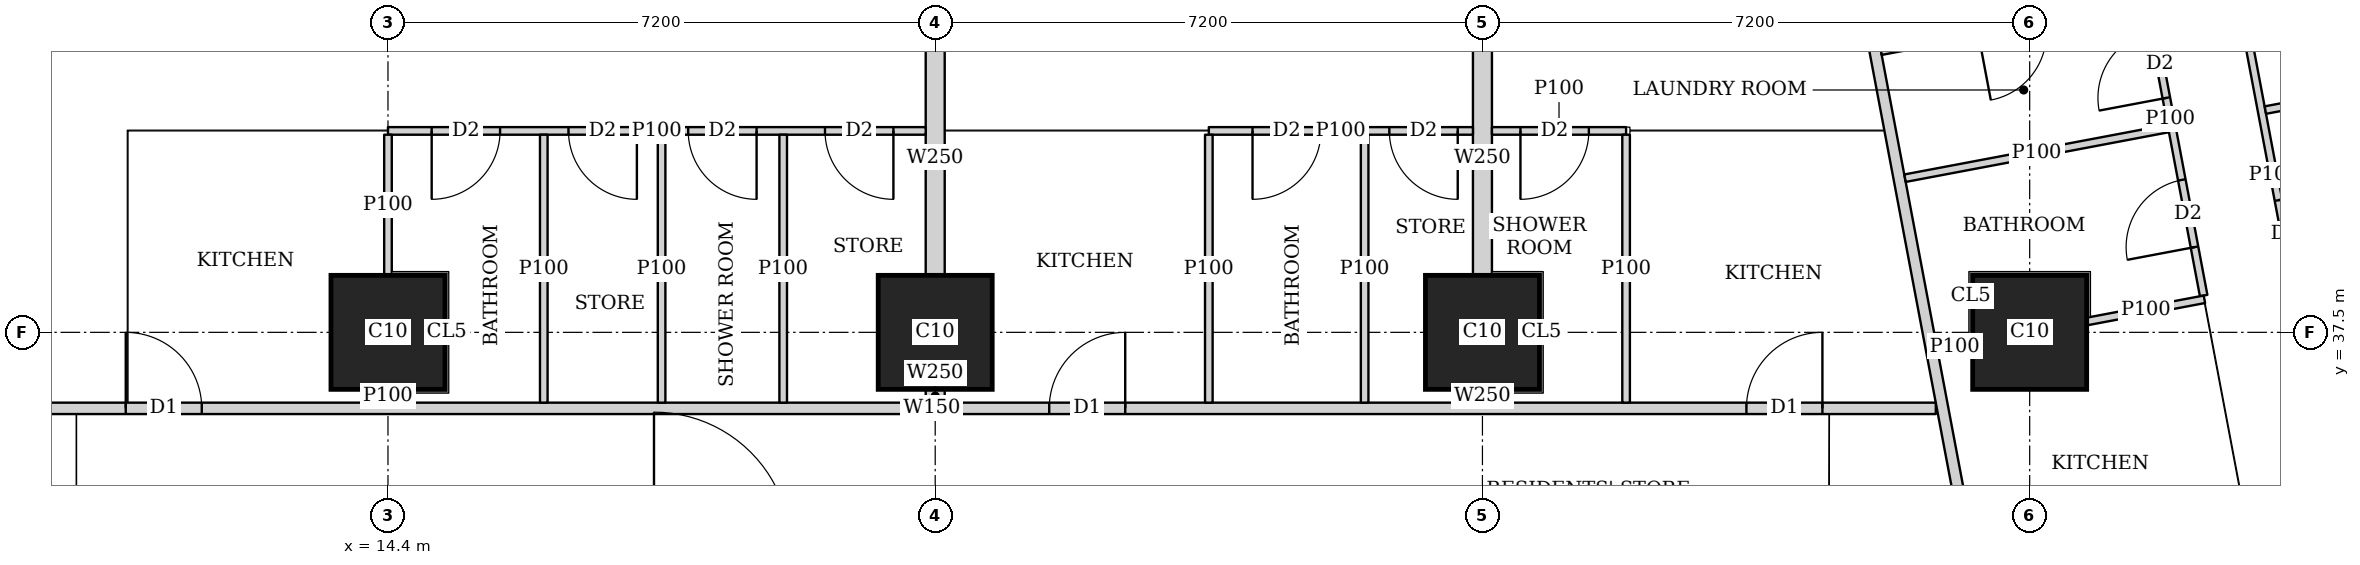
"""IFC4 building model, lengths in metres.
Left out: names, types, materials, properties, quantities, classifications, styles, units other than length and angle.
Written with IfcOpenShell. Run it as: python <this file> out.ifc"""

import sys

from ifc_helpers import new_model, si_unit, direction, frame, frame_2d, origin, origin_2d, place, context, subcontext, project, spatial, rectangle, extrude, element, fill, save


model = new_model("IFC4")
c1 = context("Model", 3, precision=1e-05, world=origin(), true_north=direction((0.0, 1.0)))
c2 = subcontext(c1, "Body", "Model", "MODEL_VIEW")
j1 = project(units=[si_unit("LENGTHUNIT", "METRE"), si_unit("PLANEANGLEUNIT", "RADIAN")], contexts=[c1])
p1 = place(None, origin())
s1 = spatial("IfcSite", under=j1, at=p1, CompositionType="ELEMENT")
p2 = place(p1, origin())
s2 = spatial("IfcBuilding", under=s1, at=p2, CompositionType="ELEMENT")
p3 = place(p2, frame((0.0, 0.0, 180.8)))
s3 = spatial("IfcBuildingStorey", under=s2, at=p3, CompositionType="ELEMENT", Elevation=180.8)
for number, where, z_axis, x_axis in (
    (1, (14.4, 37.5, 0.0), (0.0, 0.0, 1.0), (1.0, 0.0, 0.0)),
    (2, (21.6, 37.5, 0.0), (0.0, 0.0, 1.0), (1.0, 0.0, 0.0)),
    (3, (28.8, 37.5, 0.0), (0.0, 0.0, 1.0), (1.0, 0.0, 0.0)),
    (4, (36.0, 37.5, 0.0), (0.0, 0.0, 1.0), (1.0, 0.0, 0.0)),
):
    element("IfcColumn", number, at=place(p3, frame(where, z_axis=z_axis, x_axis=x_axis)), inside=s3, PredefinedType="COLUMN", context=c2, shape_type="SweptSolid", body=[
        extrude(rectangle(XDim=1.5, YDim=1.5, at=origin_2d()), origin(), (0.0, 0.0, 1.0), 3.75),
    ])
p4 = place(p3, frame((8.35, 36.5, 0.0), z_axis=(0.0, 0.0, 1.0), x_axis=(1.0, 0.0, 0.0)))
e5 = element("IfcWall", 5, at=p4, inside=s3, PredefinedType="SOLIDWALL", context=c2, shape_type="SweptSolid", body=[
    extrude(rectangle(XDim=26.415, YDim=0.15, at=frame_2d((13.208, 0.0))), origin(), (0.0, 0.0, 1.0), 3.5),
])
p5 = place(p4, frame((2.6, 0.0, 0.0)))
e6 = element("IfcOpeningElement", 6, at=p5, cuts=e5, PredefinedType="OPENING", context=c2, shape_type="SweptSolid", body=[
    extrude(rectangle(XDim=1.0, YDim=2.1, at=frame_2d((0.5, 1.05))), frame((0.0, 0.085, 0.0), z_axis=(0.0, -1.0, 0.0), x_axis=(1.0, 0.0, 0.0)), (0.0, 0.0, 1.0), 0.17),
])
p6 = place(p4, frame((14.75, 0.0, 0.0)))
e7 = element("IfcOpeningElement", 7, at=p6, cuts=e5, PredefinedType="OPENING", context=c2, shape_type="SweptSolid", body=[
    extrude(rectangle(XDim=1.0, YDim=2.1, at=frame_2d((0.5, 1.05))), frame((0.0, 0.085, 0.0), z_axis=(0.0, -1.0, 0.0), x_axis=(1.0, 0.0, 0.0)), (0.0, 0.0, 1.0), 0.17),
])
p7 = place(p4, frame((23.923, 0.0, 0.0)))
e8 = element("IfcOpeningElement", 8, at=p7, cuts=e5, PredefinedType="OPENING", context=c2, shape_type="SweptSolid", body=[
    extrude(rectangle(XDim=1.0, YDim=2.1, at=frame_2d((0.5, 1.05))), frame((0.0, 0.085, 0.0), z_axis=(0.0, -1.0, 0.0), x_axis=(1.0, 0.0, 0.0)), (0.0, 0.0, 1.0), 0.17),
])
p8 = place(p3, frame((33.623, 43.022, 0.0), z_axis=(0.0, 0.0, 1.0), x_axis=(0.185596841028, -0.98262597798, 0.0)))
e9 = element("IfcWall", 9, at=p8, inside=s3, PredefinedType="SOLIDWALL", context=c2, shape_type="SweptSolid", body=[
    extrude(rectangle(XDim=41.66, YDim=0.15, at=frame_2d((20.83, 0.0))), origin(), (0.0, 0.0, 1.0), 2.5),
])
p9 = place(p8, frame((8.034, 0.0, 0.0)))
e10 = element("IfcOpeningElement", 10, at=p9, cuts=e9, PredefinedType="OPENING", context=c2, shape_type="SweptSolid", body=[
    extrude(rectangle(XDim=1.0, YDim=2.1, at=frame_2d((0.5, 1.05))), frame((0.0, 0.085, 0.0), z_axis=(0.0, -1.0, 0.0), x_axis=(1.0, 0.0, 0.0)), (0.0, 0.0, 1.0), 0.17),
])
p10 = place(p8, frame((12.611, 0.0, 0.0)))
e11 = element("IfcOpeningElement", 11, at=p10, cuts=e9, PredefinedType="OPENING", context=c2, shape_type="SweptSolid", body=[
    extrude(rectangle(XDim=1.0, YDim=2.1, at=frame_2d((0.5, 1.05))), frame((0.0, 0.085, 0.0), z_axis=(0.0, -1.0, 0.0), x_axis=(1.0, 0.0, 0.0)), (0.0, 0.0, 1.0), 0.17),
])
p11 = place(p8, frame((20.242, 0.0, 0.0)))
e12 = element("IfcOpeningElement", 12, at=p11, cuts=e9, PredefinedType="OPENING", context=c2, shape_type="SweptSolid", body=[
    extrude(rectangle(XDim=1.0, YDim=2.1, at=frame_2d((0.5, 1.05))), frame((0.0, 0.085, 0.0), z_axis=(0.0, -1.0, 0.0), x_axis=(1.0, 0.0, 0.0)), (0.0, 0.0, 1.0), 0.17),
])
p12 = place(p8, frame((31.206, 0.0, 0.0)))
e13 = element("IfcOpeningElement", 13, at=p12, cuts=e9, PredefinedType="OPENING", context=c2, shape_type="SweptSolid", body=[
    extrude(rectangle(XDim=1.0, YDim=2.1, at=frame_2d((0.5, 1.05))), frame((0.0, 0.085, 0.0), z_axis=(0.0, -1.0, 0.0), x_axis=(1.0, 0.0, 0.0)), (0.0, 0.0, 1.0), 0.17),
])
p13 = place(p3, frame((38.701, 42.27, 0.0), z_axis=(0.0, 0.0, 1.0), x_axis=(0.185474244877, -0.982649125826, 0.0)))
e14 = element("IfcWall", 14, at=p13, inside=s3, PredefinedType="PARTITIONING", context=c2, shape_type="SweptSolid", body=[
    extrude(rectangle(XDim=5.494, YDim=0.1, at=frame_2d((2.747, 0.0))), origin(), (0.0, 0.0, 1.0), 3.5),
])
p14 = place(p13, frame((3.085, 0.0, 0.0)))
e15 = element("IfcOpeningElement", 15, at=p14, cuts=e14, PredefinedType="OPENING", context=c2, shape_type="SweptSolid", body=[
    extrude(rectangle(XDim=0.9, YDim=2.1, at=frame_2d((0.45, 1.05))), frame((0.0, 0.06, 0.0), z_axis=(0.0, -1.0, 0.0), x_axis=(1.0, 0.0, 0.0)), (0.0, 0.0, 1.0), 0.12),
])
p15 = place(p3, frame((37.41, 42.639, 0.0), z_axis=(0.0, 0.0, 1.0), x_axis=(0.185579683022, -0.982629218601, 0.0)))
e16 = element("IfcWall", 16, at=p15, inside=s3, PredefinedType="PARTITIONING", context=c2, shape_type="SweptSolid", body=[
    extrude(rectangle(XDim=4.737, YDim=0.1, at=frame_2d((2.369, 0.0))), origin(), (0.0, 0.0, 1.0), 3.5),
])
p16 = place(p15, frame((3.189, 0.0, 0.0)))
e17 = element("IfcOpeningElement", 17, at=p16, cuts=e16, PredefinedType="OPENING", context=c2, shape_type="SweptSolid", body=[
    extrude(rectangle(XDim=0.9, YDim=2.1, at=frame_2d((0.45, 1.05))), frame((0.0, 0.06, 0.0), z_axis=(0.0, -1.0, 0.0), x_axis=(1.0, 0.0, 0.0)), (0.0, 0.0, 1.0), 0.12),
])
p17 = place(p15, frame((1.191, 0.0, 0.0)))
e18 = element("IfcOpeningElement", 18, at=p17, cuts=e16, PredefinedType="OPENING", context=c2, shape_type="SweptSolid", body=[
    extrude(rectangle(XDim=0.9, YDim=2.1, at=frame_2d((0.45, 1.05))), frame((0.0, 0.06, 0.0), z_axis=(0.0, -1.0, 0.0), x_axis=(1.0, 0.0, 0.0)), (0.0, 0.0, 1.0), 0.12),
])
p18 = place(p3, frame((43.277, 41.212, 0.0), z_axis=(0.0, 0.0, 1.0), x_axis=(-0.982665405803, -0.185387972203, 0.0)))
e19 = element("IfcWall", 19, at=p18, inside=s3, PredefinedType="PARTITIONING", context=c2, shape_type="SweptSolid", body=[
    extrude(rectangle(XDim=4.25, YDim=0.1, at=frame_2d((2.125, 0.0))), origin(), (0.0, 0.0, 1.0), 2.1),
])
p19 = place(p3, frame((37.823, 40.182, 0.0), z_axis=(0.0, 0.0, 1.0), x_axis=(-0.98263926043, -0.185526504472, 0.0)))
e20 = element("IfcWall", 20, at=p19, inside=s3, PredefinedType="PARTITIONING", context=c2, shape_type="SweptSolid", body=[
    extrude(rectangle(XDim=3.524, YDim=0.1, at=frame_2d((1.762, 0.0))), origin(), (0.0, 0.0, 1.0), 3.5),
])
p20 = place(p3, frame((38.299, 37.935, 0.0), z_axis=(0.0, 0.0, 1.0), x_axis=(-0.98258870752, -0.18579405764, 0.0)))
e21 = element("IfcWall", 21, at=p20, inside=s3, PredefinedType="PARTITIONING", context=c2, shape_type="SweptSolid", body=[
    extrude(rectangle(XDim=1.566, YDim=0.1, at=frame_2d((0.783, 0.0))), origin(), (0.0, 0.0, 1.0), 3.5),
])
p21 = place(p3, frame((35.24, 37.357, 0.0), z_axis=(0.0, 0.0, 1.0), x_axis=(-0.982559813104, -0.18594680334, 0.0)))
e22 = element("IfcWall", 22, at=p21, inside=s3, PredefinedType="PARTITIONING", context=c2, shape_type="SweptSolid", body=[
    extrude(rectangle(XDim=0.462, YDim=0.1, at=frame_2d((0.231, 0.0))), origin(), (0.0, 0.0, 1.0), 3.5),
])
p22 = place(p3, frame((37.507, 41.853, 0.0), z_axis=(0.0, 0.0, 1.0), x_axis=(-0.982629014545, -0.18558076348, 0.0)))
e23 = element("IfcWall", 23, at=p22, inside=s3, PredefinedType="PARTITIONING", context=c2, shape_type="SweptSolid", body=[
    extrude(rectangle(XDim=3.524, YDim=0.1, at=frame_2d((1.762, 0.0))), origin(), (0.0, 0.0, 1.0), 3.5),
])
p23 = place(p22, frame((1.324, 0.0, 0.0)))
e24 = element("IfcOpeningElement", 24, at=p23, cuts=e23, PredefinedType="OPENING", context=c2, shape_type="SweptSolid", body=[
    extrude(rectangle(XDim=0.9, YDim=2.1, at=frame_2d((0.45, 1.05))), frame((0.0, 0.06, 0.0), z_axis=(0.0, -1.0, 0.0), x_axis=(1.0, 0.0, 0.0)), (0.0, 0.0, 1.0), 0.12),
])
p24 = place(p3, frame((14.4, 40.15, 0.0), z_axis=(0.0, 0.0, 1.0), x_axis=(1.0, 0.0, 0.0)))
e25 = element("IfcWall", 25, at=p24, inside=s3, PredefinedType="PARTITIONING", context=c2, shape_type="SweptSolid", body=[
    extrude(rectangle(XDim=7.075, YDim=0.1, at=frame_2d((3.538, 0.0))), origin(), (0.0, 0.0, 1.0), 3.5),
])
p25 = place(p24, frame((0.575, 0.0, 0.0)))
e26 = element("IfcOpeningElement", 26, at=p25, cuts=e25, PredefinedType="OPENING", context=c2, shape_type="SweptSolid", body=[
    extrude(rectangle(XDim=0.9, YDim=2.1, at=frame_2d((0.45, 1.05))), frame((0.0, 0.06, 0.0), z_axis=(0.0, -1.0, 0.0), x_axis=(1.0, 0.0, 0.0)), (0.0, 0.0, 1.0), 0.12),
])
p26 = place(p24, frame((3.95, 0.0, 0.0)))
e27 = element("IfcOpeningElement", 27, at=p26, cuts=e25, PredefinedType="OPENING", context=c2, shape_type="SweptSolid", body=[
    extrude(rectangle(XDim=0.9, YDim=2.1, at=frame_2d((0.45, 1.05))), frame((0.0, 0.06, 0.0), z_axis=(0.0, -1.0, 0.0), x_axis=(1.0, 0.0, 0.0)), (0.0, 0.0, 1.0), 0.12),
])
p27 = place(p24, frame((2.375, 0.0, 0.0)))
e28 = element("IfcOpeningElement", 28, at=p27, cuts=e25, PredefinedType="OPENING", context=c2, shape_type="SweptSolid", body=[
    extrude(rectangle(XDim=0.9, YDim=2.1, at=frame_2d((0.45, 1.05))), frame((0.0, 0.06, 0.0), z_axis=(0.0, -1.0, 0.0), x_axis=(1.0, 0.0, 0.0)), (0.0, 0.0, 1.0), 0.12),
])
p28 = place(p24, frame((5.75, 0.0, 0.0)))
e29 = element("IfcOpeningElement", 29, at=p28, cuts=e25, PredefinedType="OPENING", context=c2, shape_type="SweptSolid", body=[
    extrude(rectangle(XDim=0.9, YDim=2.1, at=frame_2d((0.45, 1.05))), frame((0.0, 0.06, 0.0), z_axis=(0.0, -1.0, 0.0), x_axis=(1.0, 0.0, 0.0)), (0.0, 0.0, 1.0), 0.12),
])
p29 = place(p3, frame((14.4, 36.575, 0.0), z_axis=(0.0, 0.0, 1.0), x_axis=(0.0, 1.0, 0.0)))
e30 = element("IfcWall", 30, at=p29, inside=s3, PredefinedType="PARTITIONING", context=c2, shape_type="SweptSolid", body=[
    extrude(rectangle(XDim=0.174, YDim=0.1, at=frame_2d((0.087, 0.0))), origin(), (0.0, 0.0, 1.0), 3.5),
])
p30 = place(p3, frame((14.4, 38.251, 0.0), z_axis=(0.0, 0.0, 1.0), x_axis=(0.0, 1.0, 0.0)))
e31 = element("IfcWall", 31, at=p30, inside=s3, PredefinedType="PARTITIONING", context=c2, shape_type="SweptSolid", body=[
    extrude(rectangle(XDim=1.849, YDim=0.1, at=frame_2d((0.925, 0.0))), origin(), (0.0, 0.0, 1.0), 3.5),
])
for number, where, z_axis, x_axis in (
    (32, (18.0, 36.575, 0.0), (0.0, 0.0, 1.0), (0.0, 1.0, 0.0)),
    (33, (16.45, 36.575, 0.0), (0.0, 0.0, 1.0), (0.0, 1.0, 0.0)),
    (34, (19.6, 36.575, 0.0), (0.0, 0.0, 1.0), (0.0, 1.0, 0.0)),
):
    element("IfcWall", number, at=place(p3, frame(where, z_axis=z_axis, x_axis=x_axis)), inside=s3, PredefinedType="PARTITIONING", context=c2, shape_type="SweptSolid", body=[
        extrude(rectangle(XDim=3.525, YDim=0.1, at=frame_2d((1.763, 0.0))), origin(), (0.0, 0.0, 1.0), 3.5),
    ])
p31 = place(p3, frame((25.2, 40.15, 0.0), z_axis=(0.0, 0.0, 1.0), x_axis=(1.0, 0.0, 0.0)))
e35 = element("IfcWall", 35, at=p31, inside=s3, PredefinedType="PARTITIONING", context=c2, shape_type="SweptSolid", body=[
    extrude(rectangle(XDim=3.475, YDim=0.1, at=frame_2d((1.738, 0.0))), origin(), (0.0, 0.0, 1.0), 3.5),
])
p32 = place(p31, frame((0.575, 0.0, 0.0)))
e36 = element("IfcOpeningElement", 36, at=p32, cuts=e35, PredefinedType="OPENING", context=c2, shape_type="SweptSolid", body=[
    extrude(rectangle(XDim=0.9, YDim=2.1, at=frame_2d((0.45, 1.05))), frame((0.0, 0.06, 0.0), z_axis=(0.0, -1.0, 0.0), x_axis=(1.0, 0.0, 0.0)), (0.0, 0.0, 1.0), 0.12),
])
p33 = place(p31, frame((2.375, 0.0, 0.0)))
e37 = element("IfcOpeningElement", 37, at=p33, cuts=e35, PredefinedType="OPENING", context=c2, shape_type="SweptSolid", body=[
    extrude(rectangle(XDim=0.9, YDim=2.1, at=frame_2d((0.45, 1.05))), frame((0.0, 0.06, 0.0), z_axis=(0.0, -1.0, 0.0), x_axis=(1.0, 0.0, 0.0)), (0.0, 0.0, 1.0), 0.12),
])
for number, where, z_axis, x_axis in (
    (38, (25.2, 36.575, 0.0), (0.0, 0.0, 1.0), (0.0, 1.0, 0.0)),
    (39, (27.25, 36.575, 0.0), (0.0, 0.0, 1.0), (0.0, 1.0, 0.0)),
):
    element("IfcWall", number, at=place(p3, frame(where, z_axis=z_axis, x_axis=x_axis)), inside=s3, PredefinedType="PARTITIONING", context=c2, shape_type="SweptSolid", body=[
        extrude(rectangle(XDim=3.525, YDim=0.1, at=frame_2d((1.763, 0.0))), origin(), (0.0, 0.0, 1.0), 3.5),
    ])
p34 = place(p3, frame((21.6, 36.575, 0.0), z_axis=(0.0, 0.0, 1.0), x_axis=(0.0, 1.0, 0.0)))
e40 = element("IfcWall", 40, at=p34, inside=s3, PredefinedType="SOLIDWALL", context=c2, shape_type="SweptSolid", body=[
    extrude(rectangle(XDim=0.174, YDim=0.25, at=frame_2d((0.087, 0.0))), origin(), (0.0, 0.0, 1.0), 3.5),
])
p35 = place(p3, frame((21.6, 38.251, 0.0), z_axis=(0.0, 0.0, 1.0), x_axis=(0.0, 1.0, 0.0)))
e41 = element("IfcWall", 41, at=p35, inside=s3, PredefinedType="SOLIDWALL", context=c2, shape_type="SweptSolid", body=[
    extrude(rectangle(XDim=3.099, YDim=0.25, at=frame_2d((1.55, 0.0))), origin(), (0.0, 0.0, 1.0), 3.5),
])
p36 = place(p3, frame((28.925, 40.15, 0.0), z_axis=(0.0, 0.0, 1.0), x_axis=(1.0, 0.0, 0.0)))
e42 = element("IfcWall", 42, at=p36, inside=s3, PredefinedType="PARTITIONING", context=c2, shape_type="SweptSolid", body=[
    extrude(rectangle(XDim=1.765, YDim=0.1, at=frame_2d((0.882, 0.0))), origin(), (0.0, 0.0, 1.0), 3.5),
])
p37 = place(p36, frame((0.375, 0.0, 0.0)))
e43 = element("IfcOpeningElement", 43, at=p37, cuts=e42, PredefinedType="OPENING", context=c2, shape_type="SweptSolid", body=[
    extrude(rectangle(XDim=0.9, YDim=2.1, at=frame_2d((0.45, 1.05))), frame((0.0, 0.06, 0.0), z_axis=(0.0, -1.0, 0.0), x_axis=(1.0, 0.0, 0.0)), (0.0, 0.0, 1.0), 0.12),
])
p38 = place(p3, frame((30.69, 36.575, 0.0), z_axis=(0.0, 0.0, 1.0), x_axis=(0.0, 1.0, 0.0)))
e44 = element("IfcWall", 44, at=p38, inside=s3, PredefinedType="PARTITIONING", context=c2, shape_type="SweptSolid", body=[
    extrude(rectangle(XDim=3.525, YDim=0.1, at=frame_2d((1.763, 0.0))), origin(), (0.0, 0.0, 1.0), 3.5),
])
p39 = place(p3, frame((28.8, 36.575, 0.0), z_axis=(0.0, 0.0, 1.0), x_axis=(0.0, 1.0, 0.0)))
e45 = element("IfcWall", 45, at=p39, inside=s3, PredefinedType="SOLIDWALL", context=c2, shape_type="SweptSolid", body=[
    extrude(rectangle(XDim=0.174, YDim=0.25, at=frame_2d((0.087, 0.0))), origin(), (0.0, 0.0, 1.0), 3.5),
])
p40 = place(p3, frame((28.8, 38.251, 0.0), z_axis=(0.0, 0.0, 1.0), x_axis=(0.0, 1.0, 0.0)))
e46 = element("IfcWall", 46, at=p40, inside=s3, PredefinedType="SOLIDWALL", context=c2, shape_type="SweptSolid", body=[
    extrude(rectangle(XDim=3.099, YDim=0.25, at=frame_2d((1.55, 0.0))), origin(), (0.0, 0.0, 1.0), 3.5),
])
p41 = place(p14, origin())
e47 = element("IfcDoor", 47, at=p41, inside=s3, OperationType="SINGLE_SWING_LEFT", PredefinedType="DOOR", context=c2, shape_type="SweptSolid", body=[
    extrude(rectangle(XDim=0.9, YDim=2.1, at=frame_2d((0.45, 1.05))), frame((0.0, 0.025, 0.0), z_axis=(0.0, -1.0, 0.0), x_axis=(1.0, 0.0, 0.0)), (0.0, 0.0, 1.0), 0.05),
])
fill(e15, e47)
p42 = place(p16, origin())
e48 = element("IfcDoor", 48, at=p42, inside=s3, OperationType="SINGLE_SWING_LEFT", PredefinedType="DOOR", context=c2, shape_type="SweptSolid", body=[
    extrude(rectangle(XDim=0.9, YDim=2.1, at=frame_2d((0.45, 1.05))), frame((0.0, 0.025, 0.0), z_axis=(0.0, -1.0, 0.0), x_axis=(1.0, 0.0, 0.0)), (0.0, 0.0, 1.0), 0.05),
])
fill(e17, e48)
p43 = place(p17, origin())
e49 = element("IfcDoor", 49, at=p43, inside=s3, OperationType="SINGLE_SWING_LEFT", PredefinedType="DOOR", context=c2, shape_type="SweptSolid", body=[
    extrude(rectangle(XDim=0.9, YDim=2.1, at=frame_2d((0.45, 1.05))), frame((0.0, 0.025, 0.0), z_axis=(0.0, -1.0, 0.0), x_axis=(1.0, 0.0, 0.0)), (0.0, 0.0, 1.0), 0.05),
])
fill(e18, e49)
p44 = place(p25, origin())
e50 = element("IfcDoor", 50, at=p44, inside=s3, OperationType="SINGLE_SWING_RIGHT", PredefinedType="DOOR", context=c2, shape_type="SweptSolid", body=[
    extrude(rectangle(XDim=0.9, YDim=2.1, at=frame_2d((0.45, 1.05))), frame((0.0, 0.025, 0.0), z_axis=(0.0, -1.0, 0.0), x_axis=(1.0, 0.0, 0.0)), (0.0, 0.0, 1.0), 0.05),
])
fill(e26, e50)
p45 = place(p26, origin())
e51 = element("IfcDoor", 51, at=p45, inside=s3, OperationType="SINGLE_SWING_LEFT", PredefinedType="DOOR", context=c2, shape_type="SweptSolid", body=[
    extrude(rectangle(XDim=0.9, YDim=2.1, at=frame_2d((0.45, 1.05))), frame((0.0, 0.025, 0.0), z_axis=(0.0, -1.0, 0.0), x_axis=(1.0, 0.0, 0.0)), (0.0, 0.0, 1.0), 0.05),
])
fill(e27, e51)
p46 = place(p27, origin())
e52 = element("IfcDoor", 52, at=p46, inside=s3, OperationType="SINGLE_SWING_LEFT", PredefinedType="DOOR", context=c2, shape_type="SweptSolid", body=[
    extrude(rectangle(XDim=0.9, YDim=2.1, at=frame_2d((0.45, 1.05))), frame((0.0, 0.025, 0.0), z_axis=(0.0, -1.0, 0.0), x_axis=(1.0, 0.0, 0.0)), (0.0, 0.0, 1.0), 0.05),
])
fill(e28, e52)
p47 = place(p28, origin())
e53 = element("IfcDoor", 53, at=p47, inside=s3, OperationType="SINGLE_SWING_LEFT", PredefinedType="DOOR", context=c2, shape_type="SweptSolid", body=[
    extrude(rectangle(XDim=0.9, YDim=2.1, at=frame_2d((0.45, 1.05))), frame((0.0, 0.025, 0.0), z_axis=(0.0, -1.0, 0.0), x_axis=(1.0, 0.0, 0.0)), (0.0, 0.0, 1.0), 0.05),
])
fill(e29, e53)
p48 = place(p5, origin())
e54 = element("IfcDoor", 54, at=p48, inside=s3, OperationType="SINGLE_SWING_LEFT", PredefinedType="DOOR", context=c2, shape_type="SweptSolid", body=[
    extrude(rectangle(XDim=1.0, YDim=2.1, at=frame_2d((0.5, 1.05))), frame((0.0, 0.025, 0.0), z_axis=(0.0, -1.0, 0.0), x_axis=(1.0, 0.0, 0.0)), (0.0, 0.0, 1.0), 0.05),
])
fill(e6, e54)
p49 = place(p32, origin())
e55 = element("IfcDoor", 55, at=p49, inside=s3, OperationType="SINGLE_SWING_RIGHT", PredefinedType="DOOR", context=c2, shape_type="SweptSolid", body=[
    extrude(rectangle(XDim=0.9, YDim=2.1, at=frame_2d((0.45, 1.05))), frame((0.0, 0.025, 0.0), z_axis=(0.0, -1.0, 0.0), x_axis=(1.0, 0.0, 0.0)), (0.0, 0.0, 1.0), 0.05),
])
fill(e36, e55)
p50 = place(p33, origin())
e56 = element("IfcDoor", 56, at=p50, inside=s3, OperationType="SINGLE_SWING_LEFT", PredefinedType="DOOR", context=c2, shape_type="SweptSolid", body=[
    extrude(rectangle(XDim=0.9, YDim=2.1, at=frame_2d((0.45, 1.05))), frame((0.0, 0.025, 0.0), z_axis=(0.0, -1.0, 0.0), x_axis=(1.0, 0.0, 0.0)), (0.0, 0.0, 1.0), 0.05),
])
fill(e37, e56)
p51 = place(p6, origin())
e57 = element("IfcDoor", 57, at=p51, inside=s3, OperationType="SINGLE_SWING_RIGHT", PredefinedType="DOOR", context=c2, shape_type="SweptSolid", body=[
    extrude(rectangle(XDim=1.0, YDim=2.1, at=frame_2d((0.5, 1.05))), frame((0.0, 0.025, 0.0), z_axis=(0.0, -1.0, 0.0), x_axis=(1.0, 0.0, 0.0)), (0.0, 0.0, 1.0), 0.05),
])
fill(e7, e57)
p52 = place(p37, origin())
e58 = element("IfcDoor", 58, at=p52, inside=s3, OperationType="SINGLE_SWING_RIGHT", PredefinedType="DOOR", context=c2, shape_type="SweptSolid", body=[
    extrude(rectangle(XDim=0.9, YDim=2.1, at=frame_2d((0.45, 1.05))), frame((0.0, 0.025, 0.0), z_axis=(0.0, -1.0, 0.0), x_axis=(1.0, 0.0, 0.0)), (0.0, 0.0, 1.0), 0.05),
])
fill(e43, e58)
p53 = place(p7, origin())
e59 = element("IfcDoor", 59, at=p53, inside=s3, OperationType="SINGLE_SWING_RIGHT", PredefinedType="DOOR", context=c2, shape_type="SweptSolid", body=[
    extrude(rectangle(XDim=1.0, YDim=2.1, at=frame_2d((0.5, 1.05))), frame((0.0, 0.025, 0.0), z_axis=(0.0, -1.0, 0.0), x_axis=(1.0, 0.0, 0.0)), (0.0, 0.0, 1.0), 0.05),
])
fill(e8, e59)
save(model, sys.argv[1])
